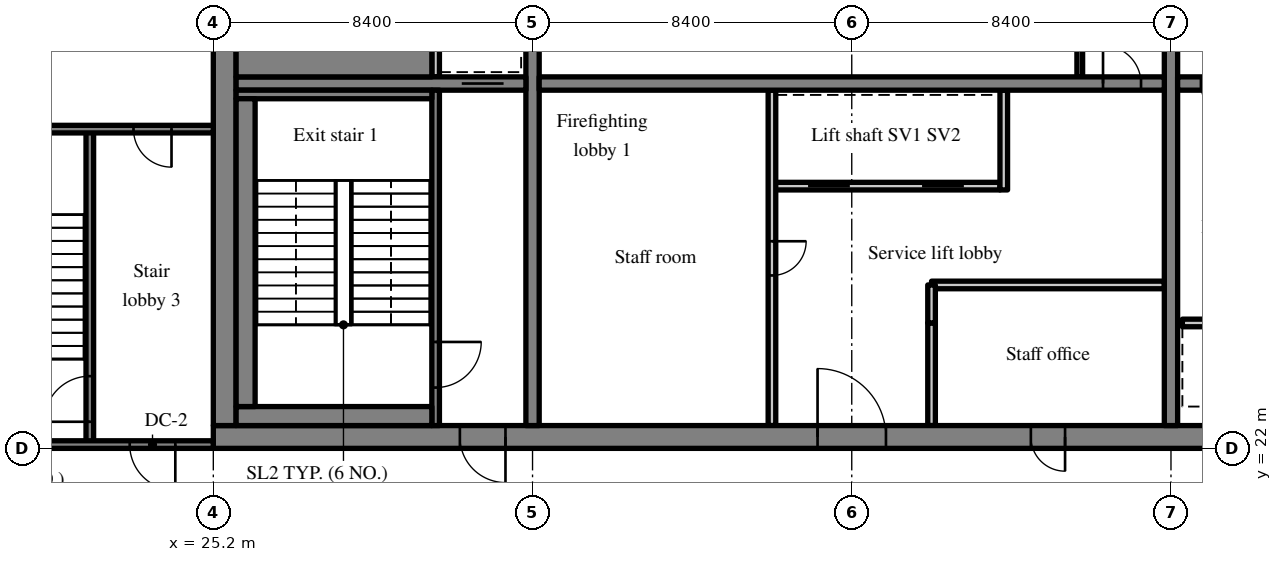
"""IFC4 building model, lengths in metres.
Left out: names, types, materials, properties, quantities, classifications, styles, units other than length and angle.
Written with IfcOpenShell. Run it as: python <this file> out.ifc"""

import sys

from ifc_helpers import new_model, si_unit, direction, frame, frame_2d, origin, place, context, subcontext, project, spatial, rectangle, extrude, source, transform, mapped, element, fill, save


model = new_model("IFC4")
c1 = context("Model", 3, precision=1e-05, world=origin(), true_north=direction((0.0, 1.0)))
c2 = subcontext(c1, "Body", "Model", "MODEL_VIEW")
j1 = project(units=[si_unit("LENGTHUNIT", "METRE"), si_unit("PLANEANGLEUNIT", "RADIAN")], contexts=[c1])
p1 = place(None, origin())
s1 = spatial("IfcSite", under=j1, at=p1, CompositionType="ELEMENT")
p2 = place(p1, origin())
s2 = spatial("IfcBuilding", under=s1, at=p2, CompositionType="ELEMENT")
p3 = place(p2, frame((0.0, 0.0, 253.0)))
s3 = spatial("IfcBuildingStorey", under=s2, at=p3, CompositionType="ELEMENT", Elevation=253.0)
m1 = source(origin(), c2, "Body", "SweptSolid", [
    extrude(rectangle(XDim=50.4, YDim=0.6, at=frame_2d((25.2, 0.0))), origin(), (0.0, 0.0, 1.0), 3.62),
])
p4 = place(p3, frame((25.2, 22.3, 0.0), z_axis=(0.0, 0.0, 1.0), x_axis=(1.0, 0.0, 0.0)))
e1 = element("IfcWall", 1, at=p4, inside=s3, PredefinedType="SHEAR", context=c2, shape_type="MappedRepresentation", body=[
    mapped(m1, transform((0.0, 0.0, 0.0), scale=1.0)),
])
m2 = source(origin(), c2, "Body", "SweptSolid", [
    extrude(rectangle(XDim=1.8, YDim=2.1, at=frame_2d((0.9, 1.05))), frame((0.0, 0.31, 0.0), z_axis=(0.0, -1.0, 0.0), x_axis=(1.0, 0.0, 0.0)), (0.0, 0.0, 1.0), 0.62),
])
p5 = place(p4, frame((15.9, 0.0, 0.0)))
e2 = element("IfcOpeningElement", 2, at=p5, cuts=e1, PredefinedType="OPENING", context=c2, shape_type="MappedRepresentation", body=[
    mapped(m2, transform((0.0, 0.0, 0.0), scale=1.0)),
])
m3 = source(origin(), c2, "Body", "SweptSolid", [
    extrude(rectangle(XDim=0.9, YDim=2.1, at=frame_2d((0.45, 1.05))), frame((0.0, 0.31, 0.0), z_axis=(0.0, -1.0, 0.0), x_axis=(1.0, 0.0, 0.0)), (0.0, 0.0, 1.0), 0.62),
])
p6 = place(p4, frame((21.513, 0.0, 0.0)))
e3 = element("IfcOpeningElement", 3, at=p6, cuts=e1, PredefinedType="OPENING", context=c2, shape_type="MappedRepresentation", body=[
    mapped(m3, transform((0.0, 0.0, 0.0), scale=1.0)),
])
p7 = place(p4, frame((32.7, 0.0, 0.0)))
e4 = element("IfcOpeningElement", 4, at=p7, cuts=e1, PredefinedType="OPENING", context=c2, shape_type="MappedRepresentation", body=[
    mapped(m2, transform((0.0, 0.0, 0.0), scale=1.0)),
])
m4 = source(origin(), c2, "Body", "SweptSolid", [
    extrude(rectangle(XDim=1.2, YDim=2.1, at=frame_2d((0.6, 1.05))), frame((0.0, 0.31, 0.0), z_axis=(0.0, -1.0, 0.0), x_axis=(1.0, 0.0, 0.0)), (0.0, 0.0, 1.0), 0.62),
])
p8 = place(p4, frame((6.488, 0.0, 0.0)))
e5 = element("IfcOpeningElement", 5, at=p8, cuts=e1, PredefinedType="OPENING", context=c2, shape_type="MappedRepresentation", body=[
    mapped(m4, transform((0.0, 0.0, 0.0), scale=1.0)),
])
p9 = place(p4, frame((47.925, 0.0, 0.0)))
e6 = element("IfcOpeningElement", 6, at=p9, cuts=e1, PredefinedType="OPENING", context=c2, shape_type="MappedRepresentation", body=[
    mapped(m4, transform((0.0, 0.0, 0.0), scale=1.0)),
])
m5 = source(origin(), c2, "Body", "SweptSolid", [
    extrude(rectangle(XDim=18.8, YDim=0.6, at=frame_2d((9.4, 0.0))), origin(), (0.0, 0.0, 1.0), 3.62),
])
p10 = place(p3, frame((25.5, 22.6, 0.0), z_axis=(0.0, 0.0, 1.0), x_axis=(0.0, 1.0, 0.0)))
e7 = element("IfcWall", 7, at=p10, inside=s3, PredefinedType="SHEAR", context=c2, shape_type="MappedRepresentation", body=[
    mapped(m5, transform((0.0, 0.0, 0.0), scale=1.0)),
])
m6 = source(origin(), c2, "Body", "SweptSolid", [
    extrude(rectangle(XDim=18.8, YDim=0.35, at=frame_2d((9.4, 0.0))), origin(), (0.0, 0.0, 1.0), 3.62),
])
p11 = place(p3, frame((33.6, 22.6, 0.0), z_axis=(0.0, 0.0, 1.0), x_axis=(0.0, 1.0, 0.0)))
e8 = element("IfcWall", 8, at=p11, inside=s3, PredefinedType="SHEAR", context=c2, shape_type="MappedRepresentation", body=[
    mapped(m6, transform((0.0, 0.0, 0.0), scale=1.0)),
])
m7 = source(origin(), c2, "Body", "SweptSolid", [
    extrude(rectangle(XDim=1.1, YDim=2.1, at=frame_2d((0.55, 1.05))), frame((0.0, 0.185, 0.0), z_axis=(0.0, -1.0, 0.0), x_axis=(1.0, 0.0, 0.0)), (0.0, 0.0, 1.0), 0.37),
])
p12 = place(p11, frame((12.85, 0.0, 0.0)))
e9 = element("IfcOpeningElement", 9, at=p12, cuts=e8, PredefinedType="OPENING", context=c2, shape_type="MappedRepresentation", body=[
    mapped(m7, transform((0.0, 0.0, 0.0), scale=1.0)),
])
p13 = place(p3, frame((50.4, 22.6, 0.0), z_axis=(0.0, 0.0, 1.0), x_axis=(0.0, 1.0, 0.0)))
e10 = element("IfcWall", 10, at=p13, inside=s3, PredefinedType="SHEAR", context=c2, shape_type="MappedRepresentation", body=[
    mapped(m6, transform((0.0, 0.0, 0.0), scale=1.0)),
])
p14 = place(p13, frame((12.85, 0.0, 0.0)))
e11 = element("IfcOpeningElement", 11, at=p14, cuts=e10, PredefinedType="OPENING", context=c2, shape_type="MappedRepresentation", body=[
    mapped(m7, transform((0.0, 0.0, 0.0), scale=1.0)),
])
m8 = source(origin(), c2, "Body", "SweptSolid", [
    extrude(rectangle(XDim=7.625, YDim=0.35, at=frame_2d((3.812, 0.0))), origin(), (0.0, 0.0, 1.0), 3.62),
])
p15 = place(p3, frame((25.8, 31.6, 0.0), z_axis=(0.0, 0.0, 1.0), x_axis=(1.0, 0.0, 0.0)))
e12 = element("IfcWall", 12, at=p15, inside=s3, PredefinedType="SHEAR", context=c2, shape_type="MappedRepresentation", body=[
    mapped(m8, transform((0.0, 0.0, 0.0), scale=1.0)),
])
p16 = place(p15, frame((5.938, 0.0, 0.0)))
e13 = element("IfcOpeningElement", 13, at=p16, cuts=e12, PredefinedType="OPENING", context=c2, shape_type="MappedRepresentation", body=[
    mapped(m7, transform((0.0, 0.0, 0.0), scale=1.0)),
])
m9 = source(origin(), c2, "Body", "SweptSolid", [
    extrude(rectangle(XDim=16.45, YDim=0.35, at=frame_2d((8.225, 0.0))), origin(), (0.0, 0.0, 1.0), 3.62),
])
p17 = place(p3, frame((33.775, 31.6, 0.0), z_axis=(0.0, 0.0, 1.0), x_axis=(1.0, 0.0, 0.0)))
e14 = element("IfcWall", 14, at=p17, inside=s3, PredefinedType="SHEAR", context=c2, shape_type="MappedRepresentation", body=[
    mapped(m9, transform((0.0, 0.0, 0.0), scale=1.0)),
])
m10 = source(origin(), c2, "Body", "SweptSolid", [
    extrude(rectangle(XDim=1.0, YDim=2.1, at=frame_2d((0.5, 1.05))), frame((0.0, 0.185, 0.0), z_axis=(0.0, -1.0, 0.0), x_axis=(1.0, 0.0, 0.0)), (0.0, 0.0, 1.0), 0.37),
])
p18 = place(p17, frame((14.837, 0.0, 0.0)))
e15 = element("IfcOpeningElement", 15, at=p18, cuts=e14, PredefinedType="OPENING", context=c2, shape_type="MappedRepresentation", body=[
    mapped(m10, transform((0.0, 0.0, 0.0), scale=1.0)),
])
m11 = source(origin(), c2, "Body", "SweptSolid", [
    extrude(rectangle(XDim=16.45, YDim=0.35, at=frame_2d((8.225, 0.0))), origin(), (0.0, 0.0, 1.0), 3.62),
])
p19 = place(p3, frame((50.575, 31.6, 0.0), z_axis=(0.0, 0.0, 1.0), x_axis=(1.0, 0.0, 0.0)))
e16 = element("IfcWall", 16, at=p19, inside=s3, PredefinedType="SHEAR", context=c2, shape_type="MappedRepresentation", body=[
    mapped(m11, transform((0.0, 0.0, 0.0), scale=1.0)),
])
p20 = place(p19, frame((0.613, 0.0, 0.0)))
e17 = element("IfcOpeningElement", 17, at=p20, cuts=e16, PredefinedType="OPENING", context=c2, shape_type="MappedRepresentation", body=[
    mapped(m10, transform((0.0, 0.0, 0.0), scale=1.0)),
])
m12 = source(origin(), c2, "Body", "SweptSolid", [
    extrude(rectangle(XDim=6.0, YDim=0.2, at=frame_2d((3.0, 0.0))), origin(), (0.0, 0.0, 1.0), 3.62),
])
p21 = place(p3, frame((39.9, 28.9, 0.0), z_axis=(0.0, 0.0, 1.0), x_axis=(1.0, 0.0, 0.0)))
e18 = element("IfcWall", 18, at=p21, inside=s3, PredefinedType="SOLIDWALL", context=c2, shape_type="MappedRepresentation", body=[
    mapped(m12, transform((0.0, 0.0, 0.0), scale=1.0)),
])
m13 = source(origin(), c2, "Body", "SweptSolid", [
    extrude(rectangle(XDim=1.1, YDim=2.1, at=frame_2d((0.55, 1.05))), frame((0.0, 0.11, 0.0), z_axis=(0.0, -1.0, 0.0), x_axis=(1.0, 0.0, 0.0)), (0.0, 0.0, 1.0), 0.22),
])
p22 = place(p21, frame((0.95, 0.0, 0.0)))
e19 = element("IfcOpeningElement", 19, at=p22, cuts=e18, PredefinedType="OPENING", context=c2, shape_type="MappedRepresentation", body=[
    mapped(m13, transform((0.0, 0.0, 0.0), scale=1.0)),
])
p23 = place(p21, frame((3.95, 0.0, 0.0)))
e20 = element("IfcOpeningElement", 20, at=p23, cuts=e18, PredefinedType="OPENING", context=c2, shape_type="MappedRepresentation", body=[
    mapped(m13, transform((0.0, 0.0, 0.0), scale=1.0)),
])
m14 = source(origin(), c2, "Body", "SweptSolid", [
    extrude(rectangle(XDim=8.825, YDim=0.2, at=frame_2d((4.413, 0.0))), origin(), (0.0, 0.0, 1.0), 3.62),
])
p24 = place(p3, frame((39.9, 22.6, 0.0), z_axis=(0.0, 0.0, 1.0), x_axis=(0.0, 1.0, 0.0)))
e21 = element("IfcWall", 21, at=p24, inside=s3, PredefinedType="PARTITIONING", context=c2, shape_type="MappedRepresentation", body=[
    mapped(m14, transform((0.0, 0.0, 0.0), scale=1.0)),
])
m15 = source(origin(), c2, "Body", "SweptSolid", [
    extrude(rectangle(XDim=0.9, YDim=2.1, at=frame_2d((0.45, 1.05))), frame((0.0, 0.11, 0.0), z_axis=(0.0, -1.0, 0.0), x_axis=(1.0, 0.0, 0.0)), (0.0, 0.0, 1.0), 0.22),
])
p25 = place(p24, frame((3.95, 0.0, 0.0)))
e22 = element("IfcOpeningElement", 22, at=p25, cuts=e21, PredefinedType="OPENING", context=c2, shape_type="MappedRepresentation", body=[
    mapped(m15, transform((0.0, 0.0, 0.0), scale=1.0)),
])
m16 = source(origin(), c2, "Body", "SweptSolid", [
    extrude(rectangle(XDim=2.7, YDim=0.2, at=frame_2d((1.35, 0.0))), origin(), (0.0, 0.0, 1.0), 3.62),
])
p26 = place(p3, frame((44.1, 22.6, 0.0), z_axis=(0.0, 0.0, 1.0), x_axis=(0.0, 1.0, 0.0)))
e23 = element("IfcWall", 23, at=p26, inside=s3, PredefinedType="PARTITIONING", context=c2, shape_type="MappedRepresentation", body=[
    mapped(m16, transform((0.0, 0.0, 0.0), scale=1.0)),
])
m17 = source(origin(), c2, "Body", "SweptSolid", [
    extrude(rectangle(XDim=2.625, YDim=0.2, at=frame_2d((1.312, 0.0))), origin(), (0.0, 0.0, 1.0), 3.62),
])
p27 = place(p3, frame((46.0, 28.8, 0.0), z_axis=(0.0, 0.0, 1.0), x_axis=(0.0, 1.0, 0.0)))
e24 = element("IfcWall", 24, at=p27, inside=s3, PredefinedType="SOLIDWALL", context=c2, shape_type="MappedRepresentation", body=[
    mapped(m17, transform((0.0, 0.0, 0.0), scale=1.0)),
])
m18 = source(origin(), c2, "Body", "SweptSolid", [
    extrude(rectangle(XDim=6.125, YDim=0.2, at=frame_2d((3.062, 0.0))), origin(), (0.0, 0.0, 1.0), 3.62),
])
p28 = place(p3, frame((44.1, 26.3, 0.0), z_axis=(0.0, 0.0, 1.0), x_axis=(1.0, 0.0, 0.0)))
e25 = element("IfcWall", 25, at=p28, inside=s3, PredefinedType="PARTITIONING", context=c2, shape_type="MappedRepresentation", body=[
    mapped(m18, transform((0.0, 0.0, 0.0), scale=1.0)),
])
m19 = source(origin(), c2, "Body", "SweptSolid", [
    extrude(rectangle(XDim=1.0, YDim=0.2, at=frame_2d((0.5, 0.0))), origin(), (0.0, 0.0, 1.0), 3.62),
])
p29 = place(p3, frame((44.1, 25.3, 0.0), z_axis=(0.0, 0.0, 1.0), x_axis=(0.0, 1.0, 0.0)))
e26 = element("IfcWall", 26, at=p29, inside=s3, PredefinedType="PARTITIONING", context=c2, shape_type="MappedRepresentation", body=[
    mapped(m19, transform((0.0, 0.0, 0.0), scale=1.0)),
])
m20 = source(origin(), c2, "Body", "SweptSolid", [
    extrude(rectangle(XDim=3.225, YDim=0.15, at=frame_2d((1.613, 0.0))), origin(), (0.0, 0.0, 1.0), 3.62),
])
p30 = place(p3, frame((48.0, 31.775, 0.0), z_axis=(0.0, 0.0, 1.0), x_axis=(0.0, 1.0, 0.0)))
e27 = element("IfcWall", 27, at=p30, inside=s3, PredefinedType="PARTITIONING", context=c2, shape_type="MappedRepresentation", body=[
    mapped(m20, transform((0.0, 0.0, 0.0), scale=1.0)),
])
p31 = place(p3, frame((56.7, 25.3, 0.0), z_axis=(0.0, 0.0, 1.0), x_axis=(-1.0, 0.0, 0.0)))
e28 = element("IfcWall", 28, at=p31, inside=s3, PredefinedType="SOLIDWALL", context=c2, shape_type="MappedRepresentation", body=[
    mapped(m12, transform((0.0, 0.0, 0.0), scale=1.0)),
])
p32 = place(p31, frame((0.95, 0.0, 0.0)))
e29 = element("IfcOpeningElement", 29, at=p32, cuts=e28, PredefinedType="OPENING", context=c2, shape_type="MappedRepresentation", body=[
    mapped(m13, transform((0.0, 0.0, 0.0), scale=1.0)),
])
p33 = place(p31, frame((3.95, 0.0, 0.0)))
e30 = element("IfcOpeningElement", 30, at=p33, cuts=e28, PredefinedType="OPENING", context=c2, shape_type="MappedRepresentation", body=[
    mapped(m13, transform((0.0, 0.0, 0.0), scale=1.0)),
])
m21 = source(origin(), c2, "Body", "SweptSolid", [
    extrude(rectangle(XDim=8.825, YDim=0.2, at=frame_2d((4.413, 0.0))), origin(), (0.0, 0.0, 1.0), 3.62),
])
p34 = place(p3, frame((31.05, 22.6, 0.0), z_axis=(0.0, 0.0, 1.0), x_axis=(0.0, 1.0, 0.0)))
e31 = element("IfcWall", 31, at=p34, inside=s3, PredefinedType="SOLIDWALL", context=c2, shape_type="MappedRepresentation", body=[
    mapped(m21, transform((0.0, 0.0, 0.0), scale=1.0)),
])
m22 = source(origin(), c2, "Body", "SweptSolid", [
    extrude(rectangle(XDim=1.2, YDim=2.1, at=frame_2d((0.6, 1.05))), frame((0.0, 0.11, 0.0), z_axis=(0.0, -1.0, 0.0), x_axis=(1.0, 0.0, 0.0)), (0.0, 0.0, 1.0), 0.22),
])
p35 = place(p34, frame((1.0, 0.0, 0.0)))
e32 = element("IfcOpeningElement", 32, at=p35, cuts=e31, PredefinedType="OPENING", context=c2, shape_type="MappedRepresentation", body=[
    mapped(m22, transform((0.0, 0.0, 0.0), scale=1.0)),
])
m23 = source(origin(), c2, "Body", "SweptSolid", [
    extrude(rectangle(XDim=1.825, YDim=0.2, at=frame_2d((0.913, 0.0))), origin(), (0.0, 0.0, 1.0), 3.62),
])
p36 = place(p3, frame((31.05, 31.775, 0.0), z_axis=(0.0, 0.0, 1.0), x_axis=(0.0, 1.0, 0.0)))
e33 = element("IfcWall", 33, at=p36, inside=s3, PredefinedType="SOLIDWALL", context=c2, shape_type="MappedRepresentation", body=[
    mapped(m23, transform((0.0, 0.0, 0.0), scale=1.0)),
])
m24 = source(origin(), c2, "Body", "SweptSolid", [
    extrude(rectangle(XDim=8.3, YDim=0.2, at=frame_2d((4.15, 0.0))), origin(), (0.0, 0.0, 1.0), 3.62),
])
p37 = place(p3, frame((21.95, 22.1, 0.0), z_axis=(0.0, 0.0, 1.0), x_axis=(0.0, 1.0, 0.0)))
e34 = element("IfcWall", 34, at=p37, inside=s3, PredefinedType="SOLIDWALL", context=c2, shape_type="MappedRepresentation", body=[
    mapped(m24, transform((0.0, 0.0, 0.0), scale=1.0)),
])
p38 = place(p37, frame((0.6, 0.0, 0.0)))
e35 = element("IfcOpeningElement", 35, at=p38, cuts=e34, PredefinedType="OPENING", context=c2, shape_type="MappedRepresentation", body=[
    mapped(m22, transform((0.0, 0.0, 0.0), scale=1.0)),
])
m25 = source(origin(), c2, "Body", "SweptSolid", [
    extrude(rectangle(XDim=8.1, YDim=0.2, at=frame_2d((4.05, 0.0))), origin(), (0.0, 0.0, 1.0), 3.62),
])
p39 = place(p3, frame((17.1, 22.1, 0.0), z_axis=(0.0, 0.0, 1.0), x_axis=(1.0, 0.0, 0.0)))
e36 = element("IfcWall", 36, at=p39, inside=s3, PredefinedType="SOLIDWALL", context=c2, shape_type="MappedRepresentation", body=[
    mapped(m25, transform((0.0, 0.0, 0.0), scale=1.0)),
])
p40 = place(p39, frame((5.9, 0.0, 0.0)))
e37 = element("IfcOpeningElement", 37, at=p40, cuts=e36, PredefinedType="OPENING", context=c2, shape_type="MappedRepresentation", body=[
    mapped(m22, transform((0.0, 0.0, 0.0), scale=1.0)),
])
p41 = place(p3, frame((17.1, 30.4, 0.0), z_axis=(0.0, 0.0, 1.0), x_axis=(1.0, 0.0, 0.0)))
e38 = element("IfcWall", 38, at=p41, inside=s3, PredefinedType="SOLIDWALL", context=c2, shape_type="MappedRepresentation", body=[
    mapped(m25, transform((0.0, 0.0, 0.0), scale=1.0)),
])
m26 = source(origin(), c2, "Body", "SweptSolid", [
    extrude(rectangle(XDim=1.0, YDim=2.1, at=frame_2d((0.5, 1.05))), frame((0.0, 0.11, 0.0), z_axis=(0.0, -1.0, 0.0), x_axis=(1.0, 0.0, 0.0)), (0.0, 0.0, 1.0), 0.22),
])
p42 = place(p41, frame((6.0, 0.0, 0.0)))
e39 = element("IfcOpeningElement", 39, at=p42, cuts=e38, PredefinedType="OPENING", context=c2, shape_type="MappedRepresentation", body=[
    mapped(m26, transform((0.0, 0.0, 0.0), scale=1.0)),
])
m27 = source(origin(), c2, "Body", "SweptSolid", [
    extrude(rectangle(XDim=5.15, YDim=0.5, at=frame_2d((2.575, 0.0))), origin(), (0.0, 0.0, 1.0), 3.62),
])
p43 = place(p3, frame((25.8, 22.85, 0.0), z_axis=(0.0, 0.0, 1.0), x_axis=(1.0, 0.0, 0.0)))
e40 = element("IfcWall", 40, at=p43, inside=s3, PredefinedType="SOLIDWALL", context=c2, shape_type="MappedRepresentation", body=[
    mapped(m27, transform((0.0, 0.0, 0.0), scale=1.0)),
])
m28 = source(origin(), c2, "Body", "SweptSolid", [
    extrude(rectangle(XDim=5.15, YDim=0.225, at=frame_2d((2.575, 0.0))), origin(), (0.0, 0.0, 1.0), 3.62),
])
p44 = place(p3, frame((25.8, 31.312, 0.0), z_axis=(0.0, 0.0, 1.0), x_axis=(1.0, 0.0, 0.0)))
e41 = element("IfcWall", 41, at=p44, inside=s3, PredefinedType="SOLIDWALL", context=c2, shape_type="MappedRepresentation", body=[
    mapped(m28, transform((0.0, 0.0, 0.0), scale=1.0)),
])
m29 = source(origin(), c2, "Body", "SweptSolid", [
    extrude(rectangle(XDim=8.1, YDim=0.5, at=frame_2d((4.05, 0.0))), origin(), (0.0, 0.0, 1.0), 3.62),
])
p45 = place(p3, frame((26.05, 23.1, 0.0), z_axis=(0.0, 0.0, 1.0), x_axis=(0.0, 1.0, 0.0)))
e42 = element("IfcWall", 42, at=p45, inside=s3, PredefinedType="SOLIDWALL", context=c2, shape_type="MappedRepresentation", body=[
    mapped(m29, transform((0.0, 0.0, 0.0), scale=1.0)),
])
m30 = source(origin(), c2, "Body", "SweptSolid", [
    extrude(rectangle(XDim=5.15, YDim=1.025, at=frame_2d((2.575, 0.0))), origin(), (0.0, 0.0, 1.0), 3.62),
])
p46 = place(p3, frame((25.8, 32.287, 0.0), z_axis=(0.0, 0.0, 1.0), x_axis=(1.0, 0.0, 0.0)))
e43 = element("IfcWall", 43, at=p46, inside=s3, PredefinedType="SOLIDWALL", context=c2, shape_type="MappedRepresentation", body=[
    mapped(m30, transform((0.0, 0.0, 0.0), scale=1.0)),
])
m31 = source(origin(), c2, "Body", "SweptSolid", [
    extrude(rectangle(XDim=1.8, YDim=2.1, at=frame_2d((0.9, 1.05))), frame((0.0, 0.225, 0.0), z_axis=(0.0, -1.0, 0.0), x_axis=(1.0, 0.0, 0.0)), (0.0, 0.0, 1.0), 0.05),
])
p47 = place(p5, origin())
e44 = element("IfcDoor", 44, at=p47, inside=s3, OperationType="DOUBLE_DOOR_SINGLE_SWING", PredefinedType="DOOR", context=c2, shape_type="MappedRepresentation", body=[
    mapped(m31, transform((0.0, 0.0, 0.0), scale=1.0)),
])
fill(e2, e44)
m32 = source(origin(), c2, "Body", "SweptSolid", [
    extrude(rectangle(XDim=1.0, YDim=2.1, at=frame_2d((0.5, 1.05))), frame((0.0, 0.025, 0.0), z_axis=(0.0, -1.0, 0.0), x_axis=(1.0, 0.0, 0.0)), (0.0, 0.0, 1.0), 0.05),
])
p48 = place(p18, origin())
e45 = element("IfcDoor", 45, at=p48, inside=s3, OperationType="SINGLE_SWING_LEFT", PredefinedType="DOOR", context=c2, shape_type="MappedRepresentation", body=[
    mapped(m32, transform((0.0, 0.0, 0.0), scale=1.0)),
])
fill(e15, e45)
m33 = source(origin(), c2, "Body", "SweptSolid", [
    extrude(rectangle(XDim=1.1, YDim=2.1, at=frame_2d((0.55, 1.05))), frame((0.0, 0.025, 0.0), z_axis=(0.0, -1.0, 0.0), x_axis=(1.0, 0.0, 0.0)), (0.0, 0.0, 1.0), 0.05),
])
p49 = place(p22, origin())
e46 = element("IfcDoor", 46, at=p49, inside=s3, OperationType="SLIDING_TO_LEFT", PredefinedType="DOOR", context=c2, shape_type="MappedRepresentation", body=[
    mapped(m33, transform((0.0, 0.0, 0.0), scale=1.0)),
])
fill(e19, e46)
p50 = place(p23, origin())
e47 = element("IfcDoor", 47, at=p50, inside=s3, OperationType="SLIDING_TO_RIGHT", PredefinedType="DOOR", context=c2, shape_type="MappedRepresentation", body=[
    mapped(m33, transform((0.0, 0.0, 0.0), scale=1.0)),
])
fill(e20, e47)
m34 = source(origin(), c2, "Body", "SweptSolid", [
    extrude(rectangle(XDim=0.9, YDim=2.1, at=frame_2d((0.45, 1.05))), frame((0.0, 0.025, 0.0), z_axis=(0.0, -1.0, 0.0), x_axis=(1.0, 0.0, 0.0)), (0.0, 0.0, 1.0), 0.05),
])
p51 = place(p25, origin())
e48 = element("IfcDoor", 48, at=p51, inside=s3, OperationType="SINGLE_SWING_RIGHT", PredefinedType="DOOR", context=c2, shape_type="MappedRepresentation", body=[
    mapped(m34, transform((0.0, 0.0, 0.0), scale=1.0)),
])
fill(e22, e48)
m35 = source(origin(), c2, "Body", "SweptSolid", [
    extrude(rectangle(XDim=0.9, YDim=2.1, at=frame_2d((0.45, 1.05))), frame((0.0, 0.225, 0.0), z_axis=(0.0, -1.0, 0.0), x_axis=(1.0, 0.0, 0.0)), (0.0, 0.0, 1.0), 0.05),
])
p52 = place(p6, origin())
e49 = element("IfcDoor", 49, at=p52, inside=s3, OperationType="SINGLE_SWING_RIGHT", PredefinedType="DOOR", context=c2, shape_type="MappedRepresentation", body=[
    mapped(m35, transform((0.0, 0.0, 0.0), scale=1.0)),
])
fill(e3, e49)
p53 = place(p20, origin())
e50 = element("IfcDoor", 50, at=p53, inside=s3, OperationType="SINGLE_SWING_RIGHT", PredefinedType="DOOR", context=c2, shape_type="MappedRepresentation", body=[
    mapped(m32, transform((0.0, 0.0, 0.0), scale=1.0)),
])
fill(e17, e50)
m36 = source(origin(), c2, "Body", "SweptSolid", [
    extrude(rectangle(XDim=1.2, YDim=2.1, at=frame_2d((0.6, 1.05))), frame((0.0, 0.025, 0.0), z_axis=(0.0, -1.0, 0.0), x_axis=(1.0, 0.0, 0.0)), (0.0, 0.0, 1.0), 0.05),
])
p54 = place(p35, origin())
e51 = element("IfcDoor", 51, at=p54, inside=s3, OperationType="SINGLE_SWING_RIGHT", PredefinedType="DOOR", context=c2, shape_type="MappedRepresentation", body=[
    mapped(m36, transform((0.0, 0.0, 0.0), scale=1.0)),
])
fill(e32, e51)
m37 = source(origin(), c2, "Body", "SweptSolid", [
    extrude(rectangle(XDim=1.2, YDim=2.1, at=frame_2d((0.6, 1.05))), frame((0.0, 0.225, 0.0), z_axis=(0.0, -1.0, 0.0), x_axis=(1.0, 0.0, 0.0)), (0.0, 0.0, 1.0), 0.05),
])
p55 = place(p8, origin())
e52 = element("IfcDoor", 52, at=p55, inside=s3, OperationType="SINGLE_SWING_RIGHT", PredefinedType="DOOR", context=c2, shape_type="MappedRepresentation", body=[
    mapped(m37, transform((0.0, 0.0, 0.0), scale=1.0)),
])
fill(e5, e52)
p56 = place(p16, origin())
e53 = element("IfcDoor", 53, at=p56, inside=s3, OperationType="SLIDING_TO_RIGHT", PredefinedType="DOOR", context=c2, shape_type="MappedRepresentation", body=[
    mapped(m33, transform((0.0, 0.0, 0.0), scale=1.0)),
])
fill(e13, e53)
p57 = place(p38, origin())
e54 = element("IfcDoor", 54, at=p57, inside=s3, OperationType="SINGLE_SWING_LEFT", PredefinedType="DOOR", context=c2, shape_type="MappedRepresentation", body=[
    mapped(m36, transform((0.0, 0.0, 0.0), scale=1.0)),
])
fill(e35, e54)
p58 = place(p40, origin())
e55 = element("IfcDoor", 55, at=p58, inside=s3, OperationType="SINGLE_SWING_RIGHT", PredefinedType="DOOR", context=c2, shape_type="MappedRepresentation", body=[
    mapped(m36, transform((0.0, 0.0, 0.0), scale=1.0)),
])
fill(e37, e55)
p59 = place(p42, origin())
e56 = element("IfcDoor", 56, at=p59, inside=s3, OperationType="SINGLE_SWING_RIGHT", PredefinedType="DOOR", context=c2, shape_type="MappedRepresentation", body=[
    mapped(m32, transform((0.0, 0.0, 0.0), scale=1.0)),
])
fill(e39, e56)
save(model, sys.argv[1])
